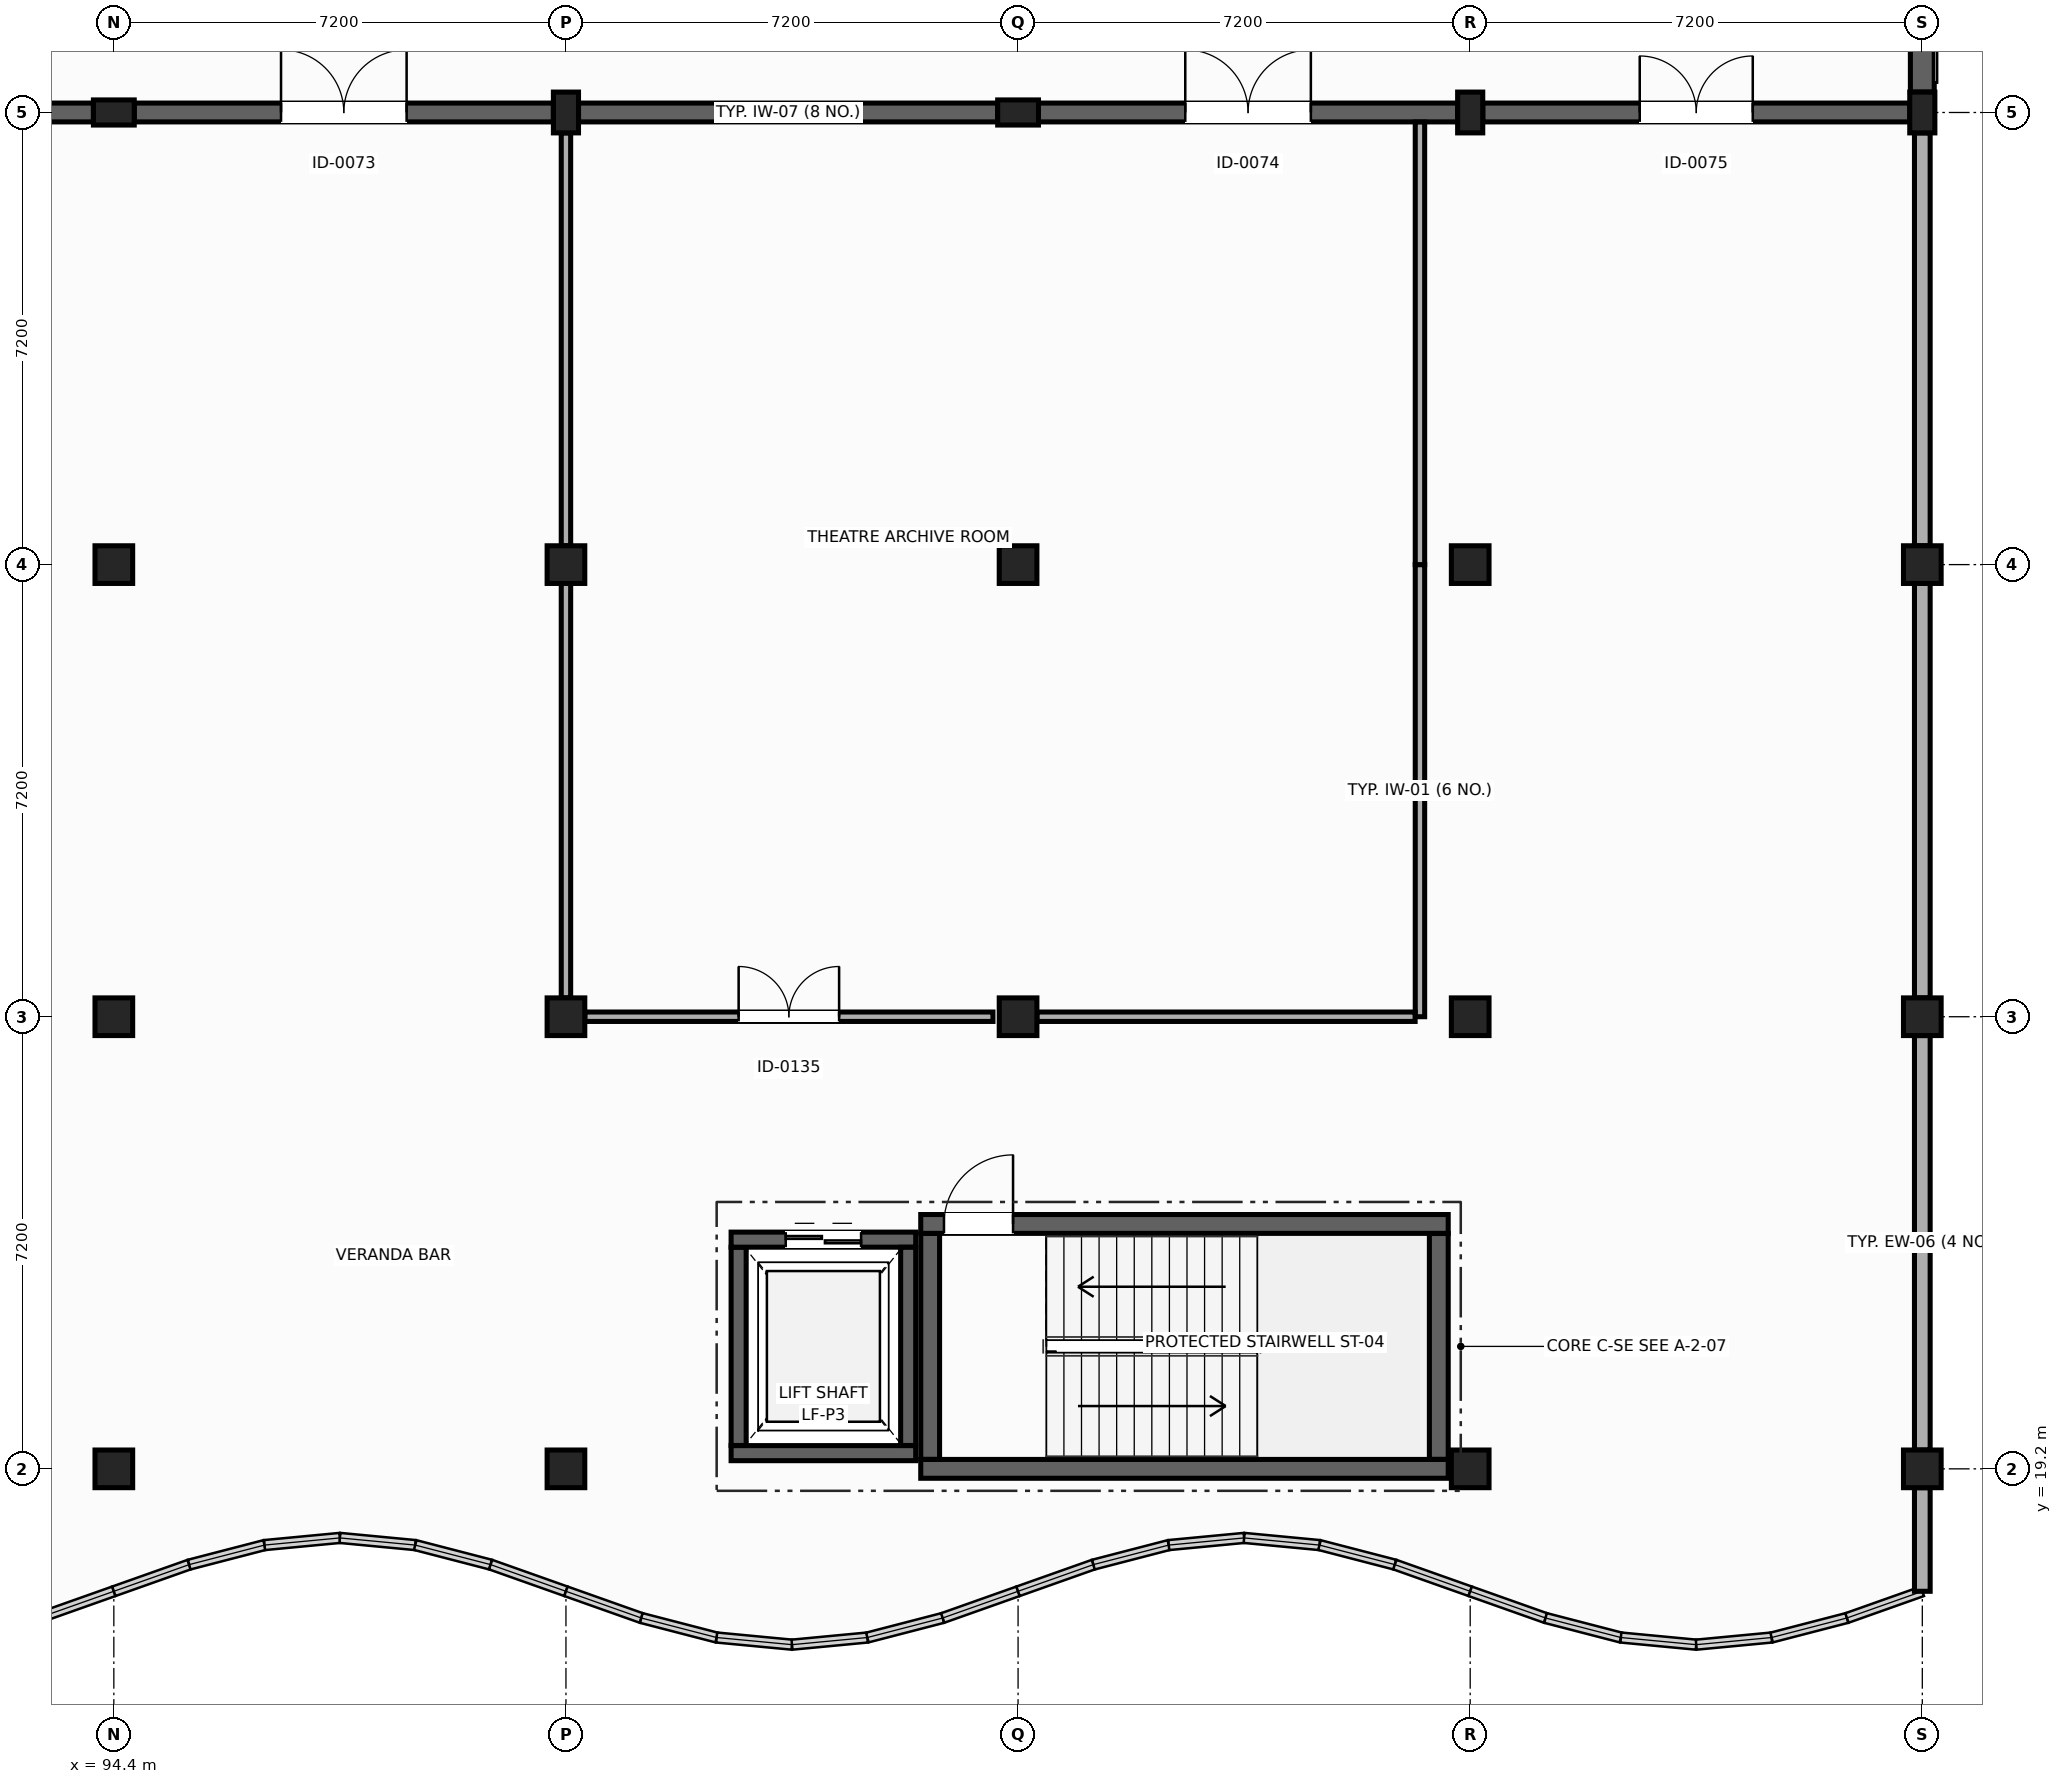
"""IFC4 building model, lengths in metres.
Left out: names, types, materials, properties, quantities, classifications, styles, units other than length and angle.
Written with IfcOpenShell. Run it as: python <this file> out.ifc"""

import sys

from ifc_helpers import new_model, si_unit, direction, frame, frame_2d, origin, origin_2d, place, context, subcontext, project, spatial, rectangle, extrude, element, fill, save


model = new_model("IFC4")
c1 = context("Model", 3, precision=1e-05, world=origin(), true_north=direction((0.0, 1.0)))
c2 = subcontext(c1, "Body", "Model", "MODEL_VIEW")
j1 = project(units=[si_unit("LENGTHUNIT", "METRE"), si_unit("PLANEANGLEUNIT", "RADIAN")], contexts=[c1])
p1 = place(None, origin())
s1 = spatial("IfcSite", under=j1, at=p1, CompositionType="ELEMENT")
p2 = place(p1, origin())
s2 = spatial("IfcBuilding", under=s1, at=p2, CompositionType="ELEMENT")
p3 = place(p2, frame((0.0, 0.0, 9.9)))
s3 = spatial("IfcBuildingStorey", under=s2, at=p3, CompositionType="ELEMENT", Elevation=9.9)
for number, where, z_axis, x_axis in (
    (1, (94.4, 19.2, 0.0), (0.0, 0.0, 1.0), (0.0, 1.0, 0.0)),
    (2, (101.6, 19.2, 0.0), (0.0, 0.0, 1.0), (1.0, 0.0, 0.0)),
    (3, (116.0, 19.2, 0.0), (0.0, 0.0, 1.0), (0.0, 1.0, 0.0)),
    (4, (123.2, 19.2, 0.0), (0.0, 0.0, 1.0), (1.0, 0.0, 0.0)),
    (5, (94.4, 26.4, 0.0), (0.0, 0.0, 1.0), (1.0, 0.0, 0.0)),
    (6, (101.6, 26.4, 0.0), (0.0, 0.0, 1.0), (1.0, 0.0, 0.0)),
    (7, (108.8, 26.4, 0.0), (0.0, 0.0, 1.0), (0.0, 1.0, 0.0)),
    (8, (116.0, 26.4, 0.0), (0.0, 0.0, 1.0), (1.0, 0.0, 0.0)),
    (9, (123.2, 26.4, 0.0), (0.0, 0.0, 1.0), (0.0, 1.0, 0.0)),
    (10, (94.4, 33.6, 0.0), (0.0, 0.0, 1.0), (1.0, 0.0, 0.0)),
    (11, (101.6, 33.6, 0.0), (0.0, 0.0, 1.0), (0.0, 1.0, 0.0)),
    (12, (108.8, 33.6, 0.0), (0.0, 0.0, 1.0), (1.0, 0.0, 0.0)),
    (13, (116.0, 33.6, 0.0), (0.0, 0.0, 1.0), (0.0, 1.0, 0.0)),
    (14, (123.2, 33.6, 0.0), (0.0, 0.0, 1.0), (1.0, 0.0, 0.0)),
):
    element("IfcColumn", number, at=place(p3, frame(where, z_axis=z_axis, x_axis=x_axis)), inside=s3, PredefinedType="COLUMN", context=c2, shape_type="SweptSolid", body=[
        extrude(rectangle(XDim=0.6, YDim=0.6, at=origin_2d()), origin(), (0.0, 0.0, 1.0), 4.5),
    ])
for number, where, z_axis, x_axis in (
    (15, (94.4, 40.8, 0.0), (0.0, 0.0, 1.0), (0.0, 1.0, 0.0)),
    (16, (101.6, 40.8, 0.0), (0.0, 0.0, 1.0), (1.0, 0.0, 0.0)),
    (17, (108.8, 40.8, 0.0), (0.0, 0.0, 1.0), (0.0, 1.0, 0.0)),
    (18, (116.0, 40.8, 0.0), (0.0, 0.0, 1.0), (1.0, 0.0, 0.0)),
    (19, (123.2, 40.8, 0.0), (0.0, 0.0, 1.0), (1.0, 0.0, 0.0)),
):
    element("IfcColumn", number, at=place(p3, frame(where, z_axis=z_axis, x_axis=x_axis)), inside=s3, PredefinedType="PILASTER", context=c2, shape_type="SweptSolid", body=[
        extrude(rectangle(XDim=0.4, YDim=0.65, at=origin_2d()), origin(), (0.0, 0.0, 1.0), 4.5),
    ])
p4 = place(p3, frame((123.2, 40.475, 0.0), z_axis=(0.0, 0.0, 1.0), x_axis=(0.0, -1.0, 0.0)))
e20 = element("IfcWall", 20, at=p4, inside=s3, PredefinedType="SOLIDWALL", context=c2, shape_type="SweptSolid", body=[
    extrude(rectangle(XDim=6.575, YDim=0.25, at=frame_2d((3.288, 0.0))), origin(), (0.0, 0.0, 1.0), 3.515),
])
for number, where, z_axis, x_axis in (
    (21, (123.2, 33.3, 0.0), (0.0, 0.0, 1.0), (0.0, -1.0, 0.0)),
    (22, (123.2, 26.1, 0.0), (0.0, 0.0, 1.0), (0.0, -1.0, 0.0)),
):
    element("IfcWall", number, at=place(p3, frame(where, z_axis=z_axis, x_axis=x_axis)), inside=s3, PredefinedType="SOLIDWALL", context=c2, shape_type="SweptSolid", body=[
        extrude(rectangle(XDim=6.6, YDim=0.25, at=frame_2d((3.3, 0.0))), origin(), (0.0, 0.0, 1.0), 3.515),
    ])
p5 = place(p3, frame((123.2, 47.8, 0.0), z_axis=(0.0, 0.0, 1.0), x_axis=(0.0, -1.0, 0.0)))
e23 = element("IfcWall", 23, at=p5, inside=s3, PredefinedType="SHEAR", context=c2, shape_type="SweptSolid", body=[
    extrude(rectangle(XDim=6.675, YDim=0.38, at=frame_2d((3.337, 0.0))), origin(), (0.0, 0.0, 1.0), 4.25),
])
p6 = place(p3, frame((123.2, 17.25, 0.0), z_axis=(0.0, 0.0, 1.0), x_axis=(0.0, 1.0, 0.0)))
e24 = element("IfcWall", 24, at=p6, inside=s3, PredefinedType="SOLIDWALL", context=c2, shape_type="SweptSolid", body=[
    extrude(rectangle(XDim=1.65, YDim=0.25, at=frame_2d((0.825, 0.0))), origin(), (0.0, 0.0, 1.0), 3.375),
])
p7 = place(p3, frame((115.65, 19.2, 0.0), z_axis=(0.0, 0.0, 1.0), x_axis=(-1.0, 0.0, 0.0)))
e25 = element("IfcWall", 25, at=p7, inside=s3, PredefinedType="SHEAR", context=c2, shape_type="SweptSolid", body=[
    extrude(rectangle(XDim=8.4, YDim=0.3, at=frame_2d((4.2, 0.0))), origin(), (0.0, 0.0, 1.0), 4.22),
])
p8 = place(p3, frame((107.4, 19.352, 0.0), z_axis=(0.0, 0.0, 1.0), x_axis=(0.0, 1.0, 0.0)))
e26 = element("IfcWall", 26, at=p8, inside=s3, PredefinedType="SHEAR", context=c2, shape_type="SweptSolid", body=[
    extrude(rectangle(XDim=3.598, YDim=0.3, at=frame_2d((1.799, 0.0))), origin(), (0.0, 0.0, 1.0), 4.22),
])
p9 = place(p3, frame((107.25, 23.1, 0.0), z_axis=(0.0, 0.0, 1.0), x_axis=(1.0, 0.0, 0.0)))
e27 = element("IfcWall", 27, at=p9, inside=s3, PredefinedType="SHEAR", context=c2, shape_type="SweptSolid", body=[
    extrude(rectangle(XDim=8.4, YDim=0.3, at=frame_2d((4.2, 0.0))), origin(), (0.0, 0.0, 1.0), 4.22),
])
p10 = place(p9, frame((0.37, 0.0, 0.0)))
e28 = element("IfcOpeningElement", 28, at=p10, cuts=e27, PredefinedType="OPENING", context=c2, shape_type="SweptSolid", body=[
    extrude(rectangle(XDim=1.1, YDim=2.15, at=frame_2d((0.55, 1.075))), frame((0.0, 0.16, 0.0), z_axis=(0.0, -1.0, 0.0), x_axis=(1.0, 0.0, 0.0)), (0.0, 0.0, 1.0), 0.32),
])
p11 = place(p3, frame((115.5, 22.948, 0.0), z_axis=(0.0, 0.0, 1.0), x_axis=(0.0, -1.0, 0.0)))
e29 = element("IfcWall", 29, at=p11, inside=s3, PredefinedType="SHEAR", context=c2, shape_type="SweptSolid", body=[
    extrude(rectangle(XDim=3.596, YDim=0.3, at=frame_2d((1.798, 0.0))), origin(), (0.0, 0.0, 1.0), 4.22),
])
p12 = place(p3, frame((107.17, 19.45, 0.0), z_axis=(0.0, 0.0, 1.0), x_axis=(-1.0, 0.0, 0.0)))
e30 = element("IfcWall", 30, at=p12, inside=s3, PredefinedType="SHEAR", context=c2, shape_type="SweptSolid", body=[
    extrude(rectangle(XDim=2.94, YDim=0.24, at=frame_2d((1.47, 0.0))), origin(), (0.0, 0.0, 1.0), 4.22),
])
p13 = place(p3, frame((104.35, 19.572, 0.0), z_axis=(0.0, 0.0, 1.0), x_axis=(0.0, 1.0, 0.0)))
e31 = element("IfcWall", 31, at=p13, inside=s3, PredefinedType="SHEAR", context=c2, shape_type="SweptSolid", body=[
    extrude(rectangle(XDim=3.158, YDim=0.24, at=frame_2d((1.579, 0.0))), origin(), (0.0, 0.0, 1.0), 4.22),
])
p14 = place(p3, frame((104.23, 22.85, 0.0), z_axis=(0.0, 0.0, 1.0), x_axis=(1.0, 0.0, 0.0)))
e32 = element("IfcWall", 32, at=p14, inside=s3, PredefinedType="SHEAR", context=c2, shape_type="SweptSolid", body=[
    extrude(rectangle(XDim=2.94, YDim=0.24, at=frame_2d((1.47, 0.0))), origin(), (0.0, 0.0, 1.0), 4.22),
])
p15 = place(p14, frame((0.87, 0.0, 0.0)))
e33 = element("IfcOpeningElement", 33, at=p15, cuts=e32, PredefinedType="OPENING", context=c2, shape_type="SweptSolid", body=[
    extrude(rectangle(XDim=1.2, YDim=2.15, at=frame_2d((0.6, 1.075))), frame((0.0, 0.13, 0.0), z_axis=(0.0, -1.0, 0.0), x_axis=(1.0, 0.0, 0.0)), (0.0, 0.0, 1.0), 0.26),
])
p16 = place(p3, frame((107.05, 22.728, 0.0), z_axis=(0.0, 0.0, 1.0), x_axis=(0.0, -1.0, 0.0)))
e34 = element("IfcWall", 34, at=p16, inside=s3, PredefinedType="SHEAR", context=c2, shape_type="SweptSolid", body=[
    extrude(rectangle(XDim=3.156, YDim=0.24, at=frame_2d((1.578, 0.0))), origin(), (0.0, 0.0, 1.0), 4.22),
])
p17 = place(p3, frame((87.4, 40.8, 0.0), z_axis=(0.0, 0.0, 1.0), x_axis=(1.0, 0.0, 0.0)))
e35 = element("IfcWall", 35, at=p17, inside=s3, PredefinedType="SHEAR", context=c2, shape_type="SweptSolid", body=[
    extrude(rectangle(XDim=6.675, YDim=0.3, at=frame_2d((3.337, 0.0))), origin(), (0.0, 0.0, 1.0), 4.22),
])
p18 = place(p17, frame((2.438, 0.0, 0.0)))
e36 = element("IfcOpeningElement", 36, at=p18, cuts=e35, PredefinedType="OPENING", context=c2, shape_type="SweptSolid", body=[
    extrude(rectangle(XDim=1.8, YDim=2.3, at=frame_2d((0.9, 1.15))), frame((0.0, 0.16, 0.0), z_axis=(0.0, -1.0, 0.0), x_axis=(1.0, 0.0, 0.0)), (0.0, 0.0, 1.0), 0.32),
])
p19 = place(p3, frame((94.725, 40.8, 0.0), z_axis=(0.0, 0.0, 1.0), x_axis=(1.0, 0.0, 0.0)))
e37 = element("IfcWall", 37, at=p19, inside=s3, PredefinedType="SHEAR", context=c2, shape_type="SweptSolid", body=[
    extrude(rectangle(XDim=6.675, YDim=0.3, at=frame_2d((3.337, 0.0))), origin(), (0.0, 0.0, 1.0), 4.22),
])
p20 = place(p19, frame((2.337, 0.0, 0.0)))
e38 = element("IfcOpeningElement", 38, at=p20, cuts=e37, PredefinedType="OPENING", context=c2, shape_type="SweptSolid", body=[
    extrude(rectangle(XDim=2.0, YDim=2.35, at=frame_2d((1.0, 1.175))), frame((0.0, 0.16, 0.0), z_axis=(0.0, -1.0, 0.0), x_axis=(1.0, 0.0, 0.0)), (0.0, 0.0, 1.0), 0.32),
])
p21 = place(p3, frame((101.8, 40.8, 0.0), z_axis=(0.0, 0.0, 1.0), x_axis=(1.0, 0.0, 0.0)))
e39 = element("IfcWall", 39, at=p21, inside=s3, PredefinedType="SHEAR", context=c2, shape_type="SweptSolid", body=[
    extrude(rectangle(XDim=6.675, YDim=0.3, at=frame_2d((3.337, 0.0))), origin(), (0.0, 0.0, 1.0), 4.22),
])
p22 = place(p3, frame((109.125, 40.8, 0.0), z_axis=(0.0, 0.0, 1.0), x_axis=(1.0, 0.0, 0.0)))
e40 = element("IfcWall", 40, at=p22, inside=s3, PredefinedType="SHEAR", context=c2, shape_type="SweptSolid", body=[
    extrude(rectangle(XDim=6.675, YDim=0.3, at=frame_2d((3.337, 0.0))), origin(), (0.0, 0.0, 1.0), 4.22),
])
p23 = place(p22, frame((2.337, 0.0, 0.0)))
e41 = element("IfcOpeningElement", 41, at=p23, cuts=e40, PredefinedType="OPENING", context=c2, shape_type="SweptSolid", body=[
    extrude(rectangle(XDim=2.0, YDim=2.35, at=frame_2d((1.0, 1.175))), frame((0.0, 0.16, 0.0), z_axis=(0.0, -1.0, 0.0), x_axis=(1.0, 0.0, 0.0)), (0.0, 0.0, 1.0), 0.32),
])
p24 = place(p3, frame((116.2, 40.8, 0.0), z_axis=(0.0, 0.0, 1.0), x_axis=(1.0, 0.0, 0.0)))
e42 = element("IfcWall", 42, at=p24, inside=s3, PredefinedType="SHEAR", context=c2, shape_type="SweptSolid", body=[
    extrude(rectangle(XDim=6.8, YDim=0.3, at=frame_2d((3.4, 0.0))), origin(), (0.0, 0.0, 1.0), 4.22),
])
p25 = place(p24, frame((2.5, 0.0, 0.0)))
e43 = element("IfcOpeningElement", 43, at=p25, cuts=e42, PredefinedType="OPENING", context=c2, shape_type="SweptSolid", body=[
    extrude(rectangle(XDim=1.8, YDim=2.3, at=frame_2d((0.9, 1.15))), frame((0.0, 0.16, 0.0), z_axis=(0.0, -1.0, 0.0), x_axis=(1.0, 0.0, 0.0)), (0.0, 0.0, 1.0), 0.32),
])
p26 = place(p3, frame((115.2, 26.4, 0.0), z_axis=(0.0, 0.0, 1.0), x_axis=(0.0, 1.0, 0.0)))
e44 = element("IfcWall", 44, at=p26, inside=s3, PredefinedType="PARTITIONING", context=c2, shape_type="SweptSolid", body=[
    extrude(rectangle(XDim=7.2, YDim=0.15, at=frame_2d((3.6, 0.0))), origin(), (0.0, 0.0, 1.0), 3.715),
])
p27 = place(p3, frame((115.2, 33.6, 0.0), z_axis=(0.0, 0.0, 1.0), x_axis=(0.0, 1.0, 0.0)))
e45 = element("IfcWall", 45, at=p27, inside=s3, PredefinedType="PARTITIONING", context=c2, shape_type="SweptSolid", body=[
    extrude(rectangle(XDim=7.048, YDim=0.15, at=frame_2d((3.524, 0.0))), origin(), (0.0, 0.0, 1.0), 3.715),
])
p28 = place(p3, frame((101.6, 40.475, 0.0), z_axis=(0.0, 0.0, 1.0), x_axis=(0.0, -1.0, 0.0)))
e46 = element("IfcWall", 46, at=p28, inside=s3, PredefinedType="PARTITIONING", context=c2, shape_type="SweptSolid", body=[
    extrude(rectangle(XDim=6.575, YDim=0.15, at=frame_2d((3.288, 0.0))), origin(), (0.0, 0.0, 1.0), 3.515),
])
p29 = place(p3, frame((101.6, 33.3, 0.0), z_axis=(0.0, 0.0, 1.0), x_axis=(0.0, -1.0, 0.0)))
e47 = element("IfcWall", 47, at=p29, inside=s3, PredefinedType="PARTITIONING", context=c2, shape_type="SweptSolid", body=[
    extrude(rectangle(XDim=6.6, YDim=0.15, at=frame_2d((3.3, 0.0))), origin(), (0.0, 0.0, 1.0), 3.515),
])
p30 = place(p3, frame((101.9, 26.4, 0.0), z_axis=(0.0, 0.0, 1.0), x_axis=(1.0, 0.0, 0.0)))
e48 = element("IfcWall", 48, at=p30, inside=s3, PredefinedType="PARTITIONING", context=c2, shape_type="SweptSolid", body=[
    extrude(rectangle(XDim=6.5, YDim=0.15, at=frame_2d((3.25, 0.0))), origin(), (0.0, 0.0, 1.0), 3.715),
])
p31 = place(p30, frame((2.45, 0.0, 0.0)))
e49 = element("IfcOpeningElement", 49, at=p31, cuts=e48, PredefinedType="OPENING", context=c2, shape_type="SweptSolid", body=[
    extrude(rectangle(XDim=1.6, YDim=2.25, at=frame_2d((0.8, 1.125))), frame((0.0, 0.085, 0.0), z_axis=(0.0, -1.0, 0.0), x_axis=(1.0, 0.0, 0.0)), (0.0, 0.0, 1.0), 0.17),
])
p32 = place(p3, frame((109.1, 26.4, 0.0), z_axis=(0.0, 0.0, 1.0), x_axis=(1.0, 0.0, 0.0)))
e50 = element("IfcWall", 50, at=p32, inside=s3, PredefinedType="PARTITIONING", context=c2, shape_type="SweptSolid", body=[
    extrude(rectangle(XDim=6.023, YDim=0.15, at=frame_2d((3.011, 0.0))), origin(), (0.0, 0.0, 1.0), 3.715),
])
p33 = place(p10, origin())
e51 = element("IfcDoor", 51, at=p33, inside=s3, OperationType="SINGLE_SWING_RIGHT", PredefinedType="DOOR", context=c2, shape_type="SweptSolid", body=[
    extrude(rectangle(XDim=1.1, YDim=2.15, at=frame_2d((0.55, 1.075))), frame((0.0, 0.025, 0.0), z_axis=(0.0, -1.0, 0.0), x_axis=(1.0, 0.0, 0.0)), (0.0, 0.0, 1.0), 0.05),
])
fill(e28, e51)
p34 = place(p15, origin())
e52 = element("IfcDoor", 52, at=p34, inside=s3, OperationType="DOUBLE_DOOR_SLIDING", PredefinedType="DOOR", context=c2, shape_type="SweptSolid", body=[
    extrude(rectangle(XDim=1.2, YDim=2.15, at=frame_2d((0.6, 1.075))), frame((0.0, 0.025, 0.0), z_axis=(0.0, -1.0, 0.0), x_axis=(1.0, 0.0, 0.0)), (0.0, 0.0, 1.0), 0.05),
])
fill(e33, e52)
p35 = place(p20, origin())
e53 = element("IfcDoor", 53, at=p35, inside=s3, OperationType="DOUBLE_DOOR_SINGLE_SWING", PredefinedType="DOOR", context=c2, shape_type="SweptSolid", body=[
    extrude(rectangle(XDim=2.0, YDim=2.35, at=frame_2d((1.0, 1.175))), frame((0.0, 0.025, 0.0), z_axis=(0.0, -1.0, 0.0), x_axis=(1.0, 0.0, 0.0)), (0.0, 0.0, 1.0), 0.05),
])
fill(e38, e53)
p36 = place(p23, origin())
e54 = element("IfcDoor", 54, at=p36, inside=s3, OperationType="DOUBLE_DOOR_SINGLE_SWING", PredefinedType="DOOR", context=c2, shape_type="SweptSolid", body=[
    extrude(rectangle(XDim=2.0, YDim=2.35, at=frame_2d((1.0, 1.175))), frame((0.0, 0.025, 0.0), z_axis=(0.0, -1.0, 0.0), x_axis=(1.0, 0.0, 0.0)), (0.0, 0.0, 1.0), 0.05),
])
fill(e41, e54)
p37 = place(p25, origin())
e55 = element("IfcDoor", 55, at=p37, inside=s3, OperationType="DOUBLE_DOOR_SINGLE_SWING", PredefinedType="DOOR", context=c2, shape_type="SweptSolid", body=[
    extrude(rectangle(XDim=1.8, YDim=2.3, at=frame_2d((0.9, 1.15))), frame((0.0, 0.025, 0.0), z_axis=(0.0, -1.0, 0.0), x_axis=(1.0, 0.0, 0.0)), (0.0, 0.0, 1.0), 0.05),
])
fill(e43, e55)
p38 = place(p31, origin())
e56 = element("IfcDoor", 56, at=p38, inside=s3, OperationType="DOUBLE_DOOR_SINGLE_SWING", PredefinedType="DOOR", context=c2, shape_type="SweptSolid", body=[
    extrude(rectangle(XDim=1.6, YDim=2.25, at=frame_2d((0.8, 1.125))), frame((0.0, 0.025, 0.0), z_axis=(0.0, -1.0, 0.0), x_axis=(1.0, 0.0, 0.0)), (0.0, 0.0, 1.0), 0.05),
])
fill(e49, e56)
save(model, sys.argv[1])
